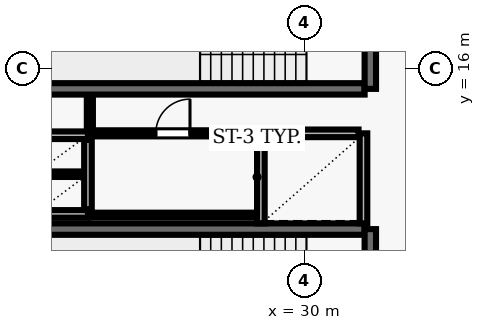
"""IFC4 building model, lengths in metres.
Left out: names, types, materials, properties, quantities, classifications, styles, units other than length and angle.
Written with IfcOpenShell. Run it as: python <this file> out.ifc"""

import sys

from ifc_helpers import new_model, si_unit, direction, frame, frame_2d, origin, place, context, subcontext, project, spatial, rectangle, extrude, element, fill, save


model = new_model("IFC4")
c1 = context("Model", 3, precision=1e-05, world=origin(), true_north=direction((0.0, 1.0)))
c2 = subcontext(c1, "Body", "Model", "MODEL_VIEW")
j1 = project(units=[si_unit("LENGTHUNIT", "METRE"), si_unit("PLANEANGLEUNIT", "RADIAN")], contexts=[c1])
p1 = place(None, origin())
s1 = spatial("IfcSite", under=j1, at=p1, CompositionType="ELEMENT")
p2 = place(p1, origin())
s2 = spatial("IfcBuilding", under=s1, at=p2, CompositionType="ELEMENT")
p3 = place(p2, frame((0.0, 0.0, 54.4)))
s3 = spatial("IfcBuildingStorey", under=s2, at=p3, CompositionType="ELEMENT", Elevation=54.4)
p4 = place(p3, frame((23.22, 15.47, 0.0), z_axis=(0.0, 0.0, 1.0), x_axis=(1.0, 0.0, 0.0)))
e1 = element("IfcWall", 1, at=p4, inside=s3, PredefinedType="SHEAR", context=c2, shape_type="SweptSolid", body=[
    extrude(rectangle(XDim=8.36, YDim=0.3, at=frame_2d((4.18, 0.0))), origin(), (0.0, 0.0, 1.0), 3.69),
])
p5 = place(p3, frame((31.73, 15.47, 0.0), z_axis=(0.0, 0.0, 1.0), x_axis=(0.0, 1.0, 0.0)))
e2 = element("IfcWall", 2, at=p5, inside=s3, PredefinedType="SHEAR", context=c2, shape_type="SweptSolid", body=[
    extrude(rectangle(XDim=3.51, YDim=0.3, at=frame_2d((1.755, 0.0))), origin(), (0.0, 0.0, 1.0), 3.69),
])
p6 = place(p5, frame((1.18, 0.0, 0.0)))
e3 = element("IfcOpeningElement", 3, at=p6, cuts=e2, PredefinedType="OPENING", context=c2, shape_type="SweptSolid", body=[
    extrude(rectangle(XDim=1.15, YDim=2.15, at=frame_2d((0.575, 1.075))), frame((0.0, 0.16, 0.0), z_axis=(0.0, -1.0, 0.0), x_axis=(1.0, 0.0, 0.0)), (0.0, 0.0, 1.0), 0.32),
])
p7 = place(p3, frame((31.58, 11.78, 0.0), z_axis=(0.0, 0.0, 1.0), x_axis=(-1.0, 0.0, 0.0)))
e4 = element("IfcWall", 4, at=p7, inside=s3, PredefinedType="SHEAR", context=c2, shape_type="SweptSolid", body=[
    extrude(rectangle(XDim=8.36, YDim=0.3, at=frame_2d((4.18, 0.0))), origin(), (0.0, 0.0, 1.0), 3.69),
])
p8 = place(p3, frame((31.73, 8.27, 0.0), z_axis=(0.0, 0.0, 1.0), x_axis=(0.0, 1.0, 0.0)))
e5 = element("IfcWall", 5, at=p8, inside=s3, PredefinedType="SHEAR", context=c2, shape_type="SweptSolid", body=[
    extrude(rectangle(XDim=3.51, YDim=0.3, at=frame_2d((1.755, 0.0))), origin(), (0.0, 0.0, 1.0), 3.69),
])
p9 = place(p8, frame((1.18, 0.0, 0.0)))
e6 = element("IfcOpeningElement", 6, at=p9, cuts=e5, PredefinedType="OPENING", context=c2, shape_type="SweptSolid", body=[
    extrude(rectangle(XDim=1.15, YDim=2.15, at=frame_2d((0.575, 1.075))), frame((0.0, 0.16, 0.0), z_axis=(0.0, -1.0, 0.0), x_axis=(1.0, 0.0, 0.0)), (0.0, 0.0, 1.0), 0.32),
])
for number, where, z_axis, x_axis in (
    (7, (28.85, 14.3, 0.0), (0.0, 0.0, 1.0), (0.0, -1.0, 0.0)),
    (8, (31.55, 11.93, 0.0), (0.0, 0.0, 1.0), (0.0, 1.0, 0.0)),
):
    element("IfcWall", number, at=place(p3, frame(where, z_axis=z_axis, x_axis=x_axis)), inside=s3, PredefinedType="SOLIDWALL", context=c2, shape_type="SweptSolid", body=[
        extrude(rectangle(XDim=2.37, YDim=0.2, at=frame_2d((1.185, 0.0))), origin(), (0.0, 0.0, 1.0), 3.69),
    ])
p10 = place(p3, frame((31.42, 14.3, 0.0), z_axis=(0.0, 0.0, 1.0), x_axis=(-1.0, 0.0, 0.0)))
e9 = element("IfcWall", 9, at=p10, inside=s3, PredefinedType="SOLIDWALL", context=c2, shape_type="SweptSolid", body=[
    extrude(rectangle(XDim=2.44, YDim=0.2, at=frame_2d((1.22, 0.0))), origin(), (0.0, 0.0, 1.0), 3.69),
])
for number, where, z_axis, x_axis in (
    (10, (22.9, 14.25, 0.0), (0.0, 0.0, 1.0), (1.0, 0.0, 0.0)),
    (11, (22.9, 12.18, 0.0), (0.0, 0.0, 1.0), (1.0, 0.0, 0.0)),
):
    element("IfcWall", number, at=place(p3, frame(where, z_axis=z_axis, x_axis=x_axis)), inside=s3, PredefinedType="SOLIDWALL", context=c2, shape_type="SweptSolid", body=[
        extrude(rectangle(XDim=1.4, YDim=0.2, at=frame_2d((0.7, 0.0))), origin(), (0.0, 0.0, 1.0), 3.69),
    ])
p11 = place(p3, frame((24.3, 12.3, 0.0), z_axis=(0.0, 0.0, 1.0), x_axis=(0.0, 1.0, 0.0)))
e12 = element("IfcWall", 12, at=p11, inside=s3, PredefinedType="SOLIDWALL", context=c2, shape_type="SweptSolid", body=[
    extrude(rectangle(XDim=1.83, YDim=0.2, at=frame_2d((0.915, 0.0))), origin(), (0.0, 0.0, 1.0), 3.69),
])
p12 = place(p3, frame((23.01, 13.225, 0.0), z_axis=(0.0, 0.0, 1.0), x_axis=(1.0, 0.0, 0.0)))
e13 = element("IfcWall", 13, at=p12, inside=s3, PredefinedType="PARTITIONING", context=c2, shape_type="SweptSolid", body=[
    extrude(rectangle(XDim=1.18, YDim=0.145, at=frame_2d((0.59, 0.0))), origin(), (0.0, 0.0, 1.0), 3.69),
])
p13 = place(p3, frame((24.35, 12.15, 0.0), z_axis=(0.0, 0.0, 1.0), x_axis=(1.0, 0.0, 0.0)))
e14 = element("IfcWall", 14, at=p13, inside=s3, PredefinedType="PARTITIONING", context=c2, shape_type="SweptSolid", body=[
    extrude(rectangle(XDim=4.37, YDim=0.125, at=frame_2d((2.185, 0.0))), origin(), (0.0, 0.0, 1.0), 3.69),
])
p14 = place(p3, frame((24.35, 14.3, 0.0), z_axis=(0.0, 0.0, 1.0), x_axis=(1.0, 0.0, 0.0)))
e15 = element("IfcWall", 15, at=p14, inside=s3, PredefinedType="PARTITIONING", context=c2, shape_type="SweptSolid", body=[
    extrude(rectangle(XDim=4.37, YDim=0.16, at=frame_2d((2.185, 0.0))), origin(), (0.0, 0.0, 1.0), 3.69),
])
p15 = place(p14, frame((1.735, 0.0, 0.0)))
e16 = element("IfcOpeningElement", 16, at=p15, cuts=e15, PredefinedType="OPENING", context=c2, shape_type="SweptSolid", body=[
    extrude(rectangle(XDim=0.9, YDim=2.1, at=frame_2d((0.45, 1.05))), frame((0.0, 0.09, 0.0), z_axis=(0.0, -1.0, 0.0), x_axis=(1.0, 0.0, 0.0)), (0.0, 0.0, 1.0), 0.18),
])
p16 = place(p3, frame((24.35, 15.29, 0.0), z_axis=(0.0, 0.0, 1.0), x_axis=(0.0, -1.0, 0.0)))
e17 = element("IfcWall", 17, at=p16, inside=s3, PredefinedType="PARTITIONING", context=c2, shape_type="SweptSolid", body=[
    extrude(rectangle(XDim=0.915, YDim=0.16, at=frame_2d((0.458, 0.0))), origin(), (0.0, 0.0, 1.0), 3.69),
])
p17 = place(p15, origin())
e18 = element("IfcDoor", 18, at=p17, inside=s3, OperationType="SINGLE_SWING_RIGHT", PredefinedType="DOOR", context=c2, shape_type="SweptSolid", body=[
    extrude(rectangle(XDim=0.9, YDim=2.1, at=frame_2d((0.45, 1.05))), frame((0.0, 0.025, 0.0), z_axis=(0.0, -1.0, 0.0), x_axis=(1.0, 0.0, 0.0)), (0.0, 0.0, 1.0), 0.05),
])
fill(e16, e18)
save(model, sys.argv[1])
